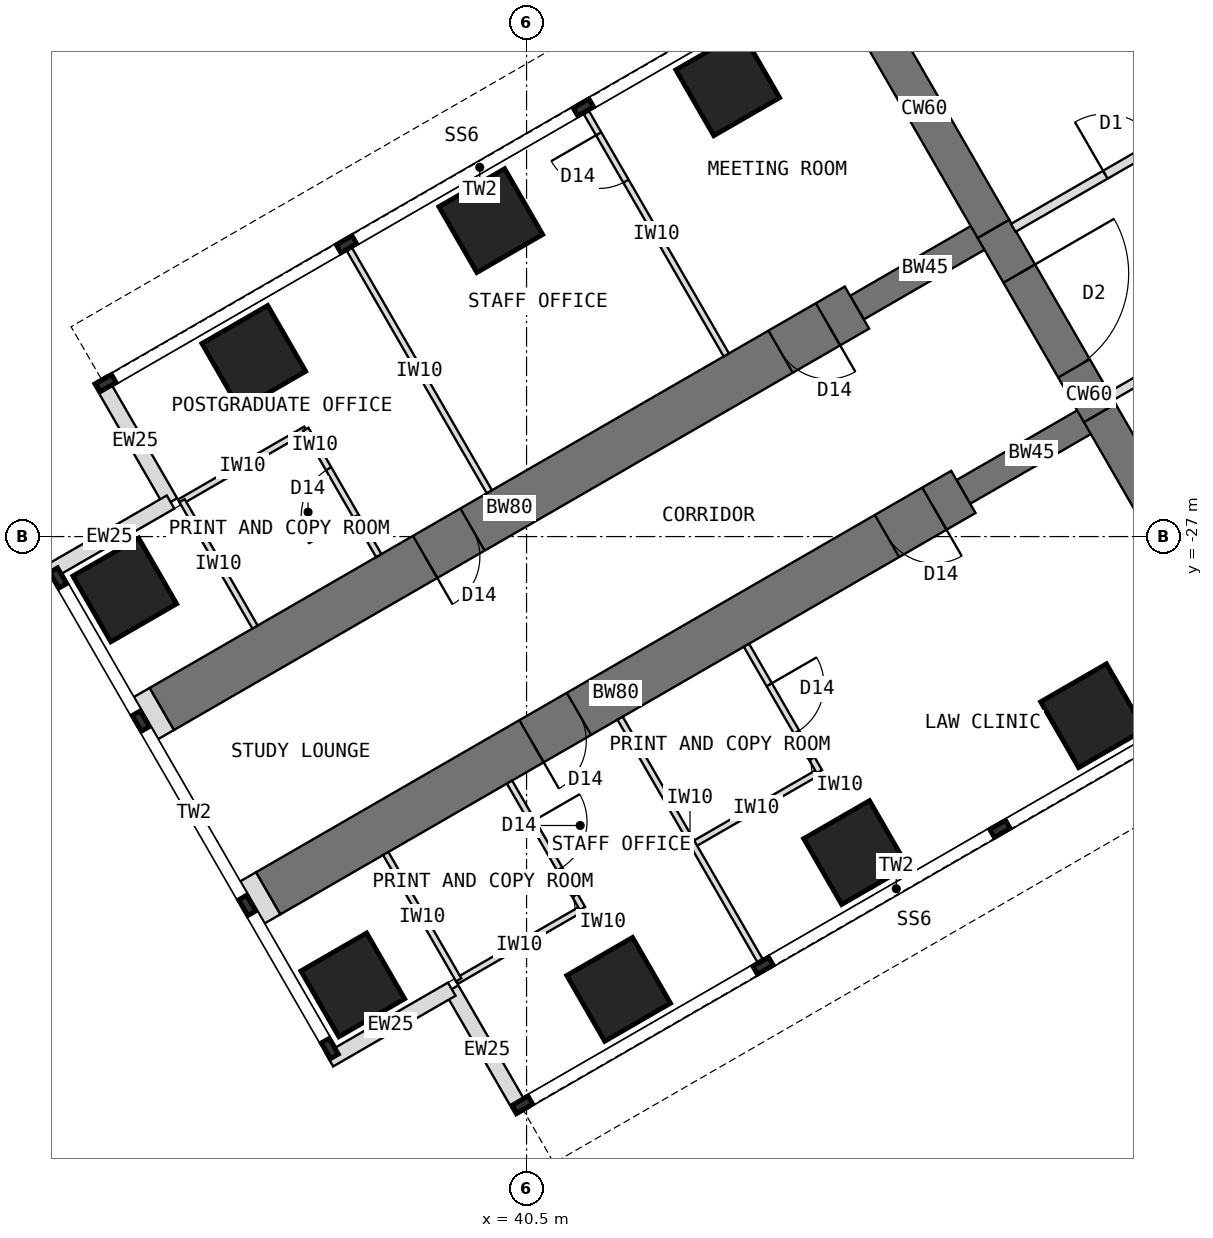
"""IFC4 building model, lengths in metres.
Left out: names, types, materials, properties, quantities, classifications, styles, units other than length and angle.
Written with IfcOpenShell. Run it as: python <this file> out.ifc"""

import sys

from ifc_helpers import new_model, si_unit, direction, frame, frame_2d, origin, origin_2d, place, context, subcontext, project, spatial, rectangle, extrude, element, fill, save


model = new_model("IFC4")
c1 = context("Model", 3, precision=1e-05, world=origin(), true_north=direction((0.0, 1.0)))
c2 = subcontext(c1, "Body", "Model", "MODEL_VIEW")
j1 = project(units=[si_unit("LENGTHUNIT", "METRE"), si_unit("PLANEANGLEUNIT", "RADIAN")], contexts=[c1])
p1 = place(None, origin())
s1 = spatial("IfcSite", under=j1, at=p1, CompositionType="ELEMENT")
p2 = place(p1, origin())
s2 = spatial("IfcBuilding", under=s1, at=p2, CompositionType="ELEMENT")
p3 = place(p2, frame((0.0, 0.0, 145.5)))
s3 = spatial("IfcBuildingStorey", under=s2, at=p3, CompositionType="ELEMENT", Elevation=145.5)
p4 = place(p3, frame((45.904, -18.0, 0.0), z_axis=(0.0, 0.0, 1.0), x_axis=(0.500024481964, -0.866011268655, 0.0)))
e1 = element("IfcWall", 1, at=p4, inside=s3, PredefinedType="SHEAR", context=c2, shape_type="SweptSolid", body=[
    extrude(rectangle(XDim=4.548, YDim=0.6, at=frame_2d((2.274, 0.0))), origin(), (0.0, 0.0, 1.0), 4.0),
])
p5 = place(p3, frame((48.178, -21.939, 0.0), z_axis=(0.0, 0.0, 1.0), x_axis=(0.500010275428, -0.866019471182, 0.0)))
e2 = element("IfcWall", 2, at=p5, inside=s3, PredefinedType="SHEAR", context=c2, shape_type="SweptSolid", body=[
    extrude(rectangle(XDim=3.5, YDim=0.6, at=frame_2d((1.75, 0.0))), origin(), (0.0, 0.0, 1.0), 4.0),
])
p6 = place(p5, frame((0.85, 0.0, 0.0)))
e3 = element("IfcOpeningElement", 3, at=p6, cuts=e2, PredefinedType="OPENING", context=c2, shape_type="SweptSolid", body=[
    extrude(rectangle(XDim=1.8, YDim=2.1, at=frame_2d((0.9, 1.05))), frame((0.0, 0.31, 0.0), z_axis=(0.0, -1.0, 0.0), x_axis=(1.0, 0.0, 0.0)), (0.0, 0.0, 1.0), 0.62),
])
p7 = place(p3, frame((49.928, -24.97, 0.0), z_axis=(0.0, 0.0, 1.0), x_axis=(0.499984222037, -0.866034513004, 0.0)))
e4 = element("IfcWall", 4, at=p7, inside=s3, PredefinedType="SHEAR", context=c2, shape_type="SweptSolid", body=[
    extrude(rectangle(XDim=4.548, YDim=0.6, at=frame_2d((2.274, 0.0))), origin(), (0.0, 0.0, 1.0), 4.0),
])
p8 = place(p3, frame((49.928, -24.97, 0.0), z_axis=(0.0, 0.0, 1.0), x_axis=(-0.866031863473, -0.499988811324, 0.0)))
e5 = element("IfcWall", 5, at=p8, inside=s3, PredefinedType="SHEAR", context=c2, shape_type="SweptSolid", body=[
    extrude(rectangle(XDim=2.592, YDim=0.45, at=frame_2d((1.296, 0.0))), origin(), (0.0, 0.0, 1.0), 4.0),
])
p9 = place(p3, frame((47.684, -26.266, 0.0), z_axis=(0.0, 0.0, 1.0), x_axis=(-0.866027579429, -0.499996231654, 0.0)))
e6 = element("IfcWall", 6, at=p9, inside=s3, PredefinedType="SHEAR", context=c2, shape_type="SweptSolid", body=[
    extrude(rectangle(XDim=13.2, YDim=0.8, at=frame_2d((6.6, 0.0))), origin(), (0.0, 0.0, 1.0), 4.0),
])
p10 = place(p9, frame((0.55, 0.0, 0.0)))
e7 = element("IfcOpeningElement", 7, at=p10, cuts=e6, PredefinedType="OPENING", context=c2, shape_type="SweptSolid", body=[
    extrude(rectangle(XDim=0.9, YDim=2.1, at=frame_2d((0.45, 1.05))), frame((0.0, 0.41, 0.0), z_axis=(0.0, -1.0, 0.0), x_axis=(1.0, 0.0, 0.0)), (0.0, 0.0, 1.0), 0.82),
])
p11 = place(p9, frame((7.3, 0.0, 0.0)))
e8 = element("IfcOpeningElement", 8, at=p11, cuts=e6, PredefinedType="OPENING", context=c2, shape_type="SweptSolid", body=[
    extrude(rectangle(XDim=0.9, YDim=2.1, at=frame_2d((0.45, 1.05))), frame((0.0, 0.41, 0.0), z_axis=(0.0, -1.0, 0.0), x_axis=(1.0, 0.0, 0.0)), (0.0, 0.0, 1.0), 0.82),
])
p12 = place(p3, frame((48.178, -21.939, 0.0), z_axis=(0.0, 0.0, 1.0), x_axis=(-0.866072649678, -0.499918158782, 0.0)))
e9 = element("IfcWall", 9, at=p12, inside=s3, PredefinedType="SHEAR", context=c2, shape_type="SweptSolid", body=[
    extrude(rectangle(XDim=2.592, YDim=0.45, at=frame_2d((1.296, 0.0))), origin(), (0.0, 0.0, 1.0), 4.0),
])
p13 = place(p3, frame((45.934, -23.234, 0.0), z_axis=(0.0, 0.0, 1.0), x_axis=(-0.866019570528, -0.500010103361, 0.0)))
e10 = element("IfcWall", 10, at=p13, inside=s3, PredefinedType="SHEAR", context=c2, shape_type="SweptSolid", body=[
    extrude(rectangle(XDim=13.2, YDim=0.8, at=frame_2d((6.6, 0.0))), origin(), (0.0, 0.0, 1.0), 4.0),
])
p14 = place(p13, frame((0.55, 0.0, 0.0)))
e11 = element("IfcOpeningElement", 11, at=p14, cuts=e10, PredefinedType="OPENING", context=c2, shape_type="SweptSolid", body=[
    extrude(rectangle(XDim=0.9, YDim=2.1, at=frame_2d((0.45, 1.05))), frame((0.0, 0.41, 0.0), z_axis=(0.0, -1.0, 0.0), x_axis=(1.0, 0.0, 0.0)), (0.0, 0.0, 1.0), 0.82),
])
p15 = place(p13, frame((7.3, 0.0, 0.0)))
e12 = element("IfcOpeningElement", 12, at=p15, cuts=e10, PredefinedType="OPENING", context=c2, shape_type="SweptSolid", body=[
    extrude(rectangle(XDim=0.9, YDim=2.1, at=frame_2d((0.45, 1.05))), frame((0.0, 0.41, 0.0), z_axis=(0.0, -1.0, 0.0), x_axis=(1.0, 0.0, 0.0)), (0.0, 0.0, 1.0), 0.82),
])
for number, where, z_axis, x_axis in (
    (13, (49.809, -29.946, 0.0), (0.0, 0.0, 1.0), (0.866, 0.5, 0.0)),
    (14, (43.809, -19.554, 0.0), (0.0, 0.0, 1.0), (0.866, 0.5, 0.0)),
    (15, (45.912, -32.196, 0.0), (0.0, 0.0, 1.0), (0.866, 0.5, 0.0)),
    (16, (39.912, -21.804, 0.0), (0.0, 0.0, 1.0), (0.866, 0.5, 0.0)),
    (17, (42.014, -34.446, 0.0), (0.0, 0.0, 1.0), (0.866, 0.5, 0.0)),
    (18, (36.014, -24.054, 0.0), (0.0, 0.0, 1.0), (0.866, 0.5, 0.0)),
    (19, (37.642, -34.373, 0.0), (0.0, 0.0, 1.0), (0.866, 0.5, 0.0)),
    (20, (33.892, -27.877, 0.0), (0.0, 0.0, 1.0), (0.866, 0.5, 0.0)),
):
    element("IfcColumn", number, at=place(p3, frame(where, z_axis=z_axis, x_axis=x_axis)), inside=s3, PredefinedType="COLUMN", context=c2, shape_type="SweptSolid", body=[
        extrude(rectangle(XDim=1.25, YDim=1.25, at=origin_2d()), origin(), (0.0, 0.0, 1.0), 4.0),
    ])
for number, where, z_axis, x_axis in (
    (21, (40.433, -36.456, 0.0), (0.0, 0.0, 1.0), (-0.5, 0.866, 0.0)),
    (22, (39.27, -34.443, 0.0), (0.0, 0.0, 1.0), (-0.866, -0.5, 0.0)),
    (23, (33.483, -24.419, 0.0), (0.0, 0.0, 1.0), (0.5, -0.866, 0.0)),
    (24, (34.645, -26.432, 0.0), (0.0, 0.0, 1.0), (-0.866, -0.5, 0.0)),
):
    element("IfcWall", number, at=place(p3, frame(where, z_axis=z_axis, x_axis=x_axis)), inside=s3, PredefinedType="STANDARD", context=c2, shape_type="SweptSolid", body=[
        extrude(rectangle(XDim=2.325, YDim=0.25, at=frame_2d((1.163, 0.0))), origin(), (0.0, 0.0, 1.0), 3.8),
    ])
p16 = place(p3, frame((36.252, -32.865, 0.0), z_axis=(0.0, 0.0, 1.0), x_axis=(-0.865778900179, -0.500426713919, 0.0)))
e25 = element("IfcWall", 25, at=p16, inside=s3, PredefinedType="PARTITIONING", context=c2, shape_type="SweptSolid", body=[
    extrude(rectangle(XDim=0.3, YDim=0.8, at=frame_2d((0.15, 0.0))), origin(), (0.0, 0.0, 1.0), 3.8),
])
p17 = place(p3, frame((34.502, -29.834, 0.0), z_axis=(0.0, 0.0, 1.0), x_axis=(-0.866131372301, -0.499816412211, 0.0)))
e26 = element("IfcWall", 26, at=p17, inside=s3, PredefinedType="PARTITIONING", context=c2, shape_type="SweptSolid", body=[
    extrude(rectangle(XDim=0.3, YDim=0.8, at=frame_2d((0.15, 0.0))), origin(), (0.0, 0.0, 1.0), 3.8),
])
p18 = place(p3, frame((52.38, -19.201, 0.0), z_axis=(0.0, 0.0, 1.0), x_axis=(-0.866027317282, 0.49999668571, 0.0)))
e27 = element("IfcWall", 27, at=p18, inside=s3, PredefinedType="SHEAR", context=c2, shape_type="SweptSolid", body=[
    extrude(rectangle(XDim=5.908, YDim=0.4, at=frame_2d((2.954, 0.0))), origin(), (0.0, 0.0, 1.0), 4.0),
])
p19 = place(p3, frame((42.038, -29.987, 0.0), z_axis=(0.0, 0.0, 1.0), x_axis=(0.499975146636, -0.866039752405, 0.0)))
e28 = element("IfcWall", 28, at=p19, inside=s3, PredefinedType="PARTITIONING", context=c2, shape_type="SweptSolid", body=[
    extrude(rectangle(XDim=4.6, YDim=0.1, at=frame_2d((2.3, 0.0))), origin(), (0.0, 0.0, 1.0), 3.8),
])
p20 = place(p3, frame((45.316, -30.865, 0.0), z_axis=(0.0, 0.0, 1.0), x_axis=(-0.866024647952, -0.500001309137, 0.0)))
e29 = element("IfcWall", 29, at=p20, inside=s3, PredefinedType="PARTITIONING", context=c2, shape_type="SweptSolid", body=[
    extrude(rectangle(XDim=2.4, YDim=0.1, at=frame_2d((1.2, 0.0))), origin(), (0.0, 0.0, 1.0), 3.8),
])
p21 = place(p3, frame((44.116, -28.787, 0.0), z_axis=(0.0, 0.0, 1.0), x_axis=(0.499957262057, -0.866050077142, 0.0)))
e30 = element("IfcWall", 30, at=p21, inside=s3, PredefinedType="PARTITIONING", context=c2, shape_type="SweptSolid", body=[
    extrude(rectangle(XDim=2.4, YDim=0.1, at=frame_2d((1.2, 0.0))), origin(), (0.0, 0.0, 1.0), 3.8),
])
p22 = place(p21, frame((0.75, 0.0, 0.0)))
e31 = element("IfcOpeningElement", 31, at=p22, cuts=e30, PredefinedType="OPENING", context=c2, shape_type="SweptSolid", body=[
    extrude(rectangle(XDim=0.9, YDim=2.1, at=frame_2d((0.45, 1.05))), frame((0.0, 0.06, 0.0), z_axis=(0.0, -1.0, 0.0), x_axis=(1.0, 0.0, 0.0)), (0.0, 0.0, 1.0), 0.12),
])
p23 = place(p3, frame((41.419, -33.115, 0.0), z_axis=(0.0, 0.0, 1.0), x_axis=(-0.866050077142, -0.499957262057, 0.0)))
e32 = element("IfcWall", 32, at=p23, inside=s3, PredefinedType="PARTITIONING", context=c2, shape_type="SweptSolid", body=[
    extrude(rectangle(XDim=2.4, YDim=0.1, at=frame_2d((1.2, 0.0))), origin(), (0.0, 0.0, 1.0), 3.8),
])
p24 = place(p3, frame((40.219, -31.037, 0.0), z_axis=(0.0, 0.0, 1.0), x_axis=(0.500033551112, -0.866006032174, 0.0)))
e33 = element("IfcWall", 33, at=p24, inside=s3, PredefinedType="PARTITIONING", context=c2, shape_type="SweptSolid", body=[
    extrude(rectangle(XDim=2.4, YDim=0.1, at=frame_2d((1.2, 0.0))), origin(), (0.0, 0.0, 1.0), 3.8),
])
p25 = place(p24, frame((0.75, 0.0, 0.0)))
e34 = element("IfcOpeningElement", 34, at=p25, cuts=e33, PredefinedType="OPENING", context=c2, shape_type="SweptSolid", body=[
    extrude(rectangle(XDim=0.9, YDim=2.1, at=frame_2d((0.45, 1.05))), frame((0.0, 0.06, 0.0), z_axis=(0.0, -1.0, 0.0), x_axis=(1.0, 0.0, 0.0)), (0.0, 0.0, 1.0), 0.12),
])
p26 = place(p3, frame((38.184, -32.212, 0.0), z_axis=(0.0, 0.0, 1.0), x_axis=(0.500033551112, -0.866006032174, 0.0)))
e35 = element("IfcWall", 35, at=p26, inside=s3, PredefinedType="PARTITIONING", context=c2, shape_type="SweptSolid", body=[
    extrude(rectangle(XDim=2.4, YDim=0.1, at=frame_2d((1.2, 0.0))), origin(), (0.0, 0.0, 1.0), 3.8),
])
p27 = place(p3, frame((43.785, -24.013, 0.0), z_axis=(0.0, 0.0, 1.0), x_axis=(-0.500014953309, 0.866016770315, 0.0)))
e36 = element("IfcWall", 36, at=p27, inside=s3, PredefinedType="PARTITIONING", context=c2, shape_type="SweptSolid", body=[
    extrude(rectangle(XDim=4.6, YDim=0.1, at=frame_2d((2.3, 0.0))), origin(), (0.0, 0.0, 1.0), 3.8),
])
p28 = place(p27, frame((3.3, 0.0, 0.0)))
e37 = element("IfcOpeningElement", 37, at=p28, cuts=e36, PredefinedType="OPENING", context=c2, shape_type="SweptSolid", body=[
    extrude(rectangle(XDim=0.9, YDim=2.1, at=frame_2d((0.45, 1.05))), frame((0.0, 0.06, 0.0), z_axis=(0.0, -1.0, 0.0), x_axis=(1.0, 0.0, 0.0)), (0.0, 0.0, 1.0), 0.12),
])
p29 = place(p3, frame((39.888, -26.263, 0.0), z_axis=(0.0, 0.0, 1.0), x_axis=(-0.500014953309, 0.866016770315, 0.0)))
e38 = element("IfcWall", 38, at=p29, inside=s3, PredefinedType="PARTITIONING", context=c2, shape_type="SweptSolid", body=[
    extrude(rectangle(XDim=4.6, YDim=0.1, at=frame_2d((2.3, 0.0))), origin(), (0.0, 0.0, 1.0), 3.8),
])
p30 = place(p3, frame((36.869, -25.235, 0.0), z_axis=(0.0, 0.0, 1.0), x_axis=(-0.866050077142, -0.499957262057, 0.0)))
e39 = element("IfcWall", 39, at=p30, inside=s3, PredefinedType="PARTITIONING", context=c2, shape_type="SweptSolid", body=[
    extrude(rectangle(XDim=2.4, YDim=0.1, at=frame_2d((1.2, 0.0))), origin(), (0.0, 0.0, 1.0), 3.8),
])
p31 = place(p3, frame((38.069, -27.313, 0.0), z_axis=(0.0, 0.0, 1.0), x_axis=(-0.500001309137, 0.866024647952, 0.0)))
e40 = element("IfcWall", 40, at=p31, inside=s3, PredefinedType="PARTITIONING", context=c2, shape_type="SweptSolid", body=[
    extrude(rectangle(XDim=2.4, YDim=0.1, at=frame_2d((1.2, 0.0))), origin(), (0.0, 0.0, 1.0), 3.8),
])
p32 = place(p31, frame((0.75, 0.0, 0.0)))
e41 = element("IfcOpeningElement", 41, at=p32, cuts=e40, PredefinedType="OPENING", context=c2, shape_type="SweptSolid", body=[
    extrude(rectangle(XDim=0.9, YDim=2.1, at=frame_2d((0.45, 1.05))), frame((0.0, 0.06, 0.0), z_axis=(0.0, -1.0, 0.0), x_axis=(1.0, 0.0, 0.0)), (0.0, 0.0, 1.0), 0.12),
])
p33 = place(p3, frame((36.034, -28.488, 0.0), z_axis=(0.0, 0.0, 1.0), x_axis=(-0.500001309137, 0.866024647952, 0.0)))
e42 = element("IfcWall", 42, at=p33, inside=s3, PredefinedType="PARTITIONING", context=c2, shape_type="SweptSolid", body=[
    extrude(rectangle(XDim=2.4, YDim=0.1, at=frame_2d((1.2, 0.0))), origin(), (0.0, 0.0, 1.0), 3.8),
])
p34 = place(p3, frame((54.017, -22.436, 0.0), z_axis=(0.0, 0.0, 1.0), x_axis=(-0.86602002524, -0.500009315796, 0.0)))
e43 = element("IfcWall", 43, at=p34, inside=s3, PredefinedType="PARTITIONING", context=c2, shape_type="SweptSolid", body=[
    extrude(rectangle(XDim=4.519, YDim=0.15, at=frame_2d((2.259, 0.0))), origin(), (0.0, 0.0, 1.0), 3.8),
])
p35 = place(p34, frame((1.769, 0.0, 0.0)))
e44 = element("IfcOpeningElement", 44, at=p35, cuts=e43, PredefinedType="OPENING", context=c2, shape_type="SweptSolid", body=[
    extrude(rectangle(XDim=1.0, YDim=2.1, at=frame_2d((0.5, 1.05))), frame((0.0, 0.085, 0.0), z_axis=(0.0, -1.0, 0.0), x_axis=(1.0, 0.0, 0.0)), (0.0, 0.0, 1.0), 0.17),
])
p36 = place(p3, frame((48.504, -21.924, 0.0), z_axis=(0.0, 0.0, 1.0), x_axis=(0.866006515865, 0.500032713409, 0.0)))
e45 = element("IfcWall", 45, at=p36, inside=s3, PredefinedType="PARTITIONING", context=c2, shape_type="SweptSolid", body=[
    extrude(rectangle(XDim=4.518, YDim=0.15, at=frame_2d((2.259, 0.0))), origin(), (0.0, 0.0, 1.0), 3.8),
])
p37 = place(p36, frame((1.749, 0.0, 0.0)))
e46 = element("IfcOpeningElement", 46, at=p37, cuts=e45, PredefinedType="OPENING", context=c2, shape_type="SweptSolid", body=[
    extrude(rectangle(XDim=1.0, YDim=2.1, at=frame_2d((0.5, 1.05))), frame((0.0, 0.085, 0.0), z_axis=(0.0, -1.0, 0.0), x_axis=(1.0, 0.0, 0.0)), (0.0, 0.0, 1.0), 0.17),
])
p38 = place(p6, origin())
e47 = element("IfcDoor", 47, at=p38, inside=s3, OperationType="DOUBLE_DOOR_DOUBLE_SWING", PredefinedType="DOOR", context=c2, shape_type="SweptSolid", body=[
    extrude(rectangle(XDim=1.72, YDim=2.06, at=frame_2d((0.9, 1.03))), frame((0.0, 0.025, 0.0), z_axis=(0.0, -1.0, 0.0), x_axis=(1.0, 0.0, 0.0)), (0.0, 0.0, 1.0), 0.05),
    extrude(rectangle(XDim=0.04, YDim=2.1, at=frame_2d((0.02, 1.05))), frame((0.0, 0.3, 0.0), z_axis=(0.0, -1.0, 0.0), x_axis=(1.0, 0.0, 0.0)), (0.0, 0.0, 1.0), 0.6),
    extrude(rectangle(XDim=0.04, YDim=2.1, at=frame_2d((1.78, 1.05))), frame((0.0, 0.3, 0.0), z_axis=(0.0, -1.0, 0.0), x_axis=(1.0, 0.0, 0.0)), (0.0, 0.0, 1.0), 0.6),
    extrude(rectangle(XDim=1.72, YDim=0.04, at=frame_2d((0.9, 2.08))), frame((0.0, 0.3, 0.0), z_axis=(0.0, -1.0, 0.0), x_axis=(1.0, 0.0, 0.0)), (0.0, 0.0, 1.0), 0.6),
])
fill(e3, e47)
p39 = place(p22, origin())
e48 = element("IfcDoor", 48, at=p39, inside=s3, OperationType="SINGLE_SWING_LEFT", PredefinedType="DOOR", context=c2, shape_type="SweptSolid", body=[
    extrude(rectangle(XDim=0.9, YDim=2.1, at=frame_2d((0.45, 1.05))), frame((0.0, 0.025, 0.0), z_axis=(0.0, -1.0, 0.0), x_axis=(1.0, 0.0, 0.0)), (0.0, 0.0, 1.0), 0.05),
])
fill(e31, e48)
p40 = place(p25, origin())
e49 = element("IfcDoor", 49, at=p40, inside=s3, OperationType="SINGLE_SWING_LEFT", PredefinedType="DOOR", context=c2, shape_type="SweptSolid", body=[
    extrude(rectangle(XDim=0.9, YDim=2.1, at=frame_2d((0.45, 1.05))), frame((0.0, 0.025, 0.0), z_axis=(0.0, -1.0, 0.0), x_axis=(1.0, 0.0, 0.0)), (0.0, 0.0, 1.0), 0.05),
])
fill(e34, e49)
p41 = place(p28, origin())
e50 = element("IfcDoor", 50, at=p41, inside=s3, OperationType="SINGLE_SWING_RIGHT", PredefinedType="DOOR", context=c2, shape_type="SweptSolid", body=[
    extrude(rectangle(XDim=0.9, YDim=2.1, at=frame_2d((0.45, 1.05))), frame((0.0, 0.025, 0.0), z_axis=(0.0, -1.0, 0.0), x_axis=(1.0, 0.0, 0.0)), (0.0, 0.0, 1.0), 0.05),
])
fill(e37, e50)
p42 = place(p32, origin())
e51 = element("IfcDoor", 51, at=p42, inside=s3, OperationType="SINGLE_SWING_LEFT", PredefinedType="DOOR", context=c2, shape_type="SweptSolid", body=[
    extrude(rectangle(XDim=0.9, YDim=2.1, at=frame_2d((0.45, 1.05))), frame((0.0, 0.025, 0.0), z_axis=(0.0, -1.0, 0.0), x_axis=(1.0, 0.0, 0.0)), (0.0, 0.0, 1.0), 0.05),
])
fill(e41, e51)
p43 = place(p37, origin())
e52 = element("IfcDoor", 52, at=p43, inside=s3, OperationType="SINGLE_SWING_LEFT", PredefinedType="DOOR", context=c2, shape_type="SweptSolid", body=[
    extrude(rectangle(XDim=1.0, YDim=2.1, at=frame_2d((0.5, 1.05))), frame((0.0, 0.025, 0.0), z_axis=(0.0, -1.0, 0.0), x_axis=(1.0, 0.0, 0.0)), (0.0, 0.0, 1.0), 0.05),
])
fill(e46, e52)
p44 = place(p10, origin())
e53 = element("IfcDoor", 53, at=p44, inside=s3, OperationType="SINGLE_SWING_LEFT", PredefinedType="DOOR", context=c2, shape_type="SweptSolid", body=[
    extrude(rectangle(XDim=0.82, YDim=2.06, at=frame_2d((0.45, 1.03))), frame((0.0, 0.025, 0.0), z_axis=(0.0, -1.0, 0.0), x_axis=(1.0, 0.0, 0.0)), (0.0, 0.0, 1.0), 0.05),
    extrude(rectangle(XDim=0.04, YDim=2.1, at=frame_2d((0.02, 1.05))), frame((0.0, 0.4, 0.0), z_axis=(0.0, -1.0, 0.0), x_axis=(1.0, 0.0, 0.0)), (0.0, 0.0, 1.0), 0.8),
    extrude(rectangle(XDim=0.04, YDim=2.1, at=frame_2d((0.88, 1.05))), frame((0.0, 0.4, 0.0), z_axis=(0.0, -1.0, 0.0), x_axis=(1.0, 0.0, 0.0)), (0.0, 0.0, 1.0), 0.8),
    extrude(rectangle(XDim=0.82, YDim=0.04, at=frame_2d((0.45, 2.08))), frame((0.0, 0.4, 0.0), z_axis=(0.0, -1.0, 0.0), x_axis=(1.0, 0.0, 0.0)), (0.0, 0.0, 1.0), 0.8),
])
fill(e7, e53)
p45 = place(p11, origin())
e54 = element("IfcDoor", 54, at=p45, inside=s3, OperationType="SINGLE_SWING_RIGHT", PredefinedType="DOOR", context=c2, shape_type="SweptSolid", body=[
    extrude(rectangle(XDim=0.82, YDim=2.06, at=frame_2d((0.45, 1.03))), frame((0.0, 0.025, 0.0), z_axis=(0.0, -1.0, 0.0), x_axis=(1.0, 0.0, 0.0)), (0.0, 0.0, 1.0), 0.05),
    extrude(rectangle(XDim=0.04, YDim=2.1, at=frame_2d((0.02, 1.05))), frame((0.0, 0.4, 0.0), z_axis=(0.0, -1.0, 0.0), x_axis=(1.0, 0.0, 0.0)), (0.0, 0.0, 1.0), 0.8),
    extrude(rectangle(XDim=0.04, YDim=2.1, at=frame_2d((0.88, 1.05))), frame((0.0, 0.4, 0.0), z_axis=(0.0, -1.0, 0.0), x_axis=(1.0, 0.0, 0.0)), (0.0, 0.0, 1.0), 0.8),
    extrude(rectangle(XDim=0.82, YDim=0.04, at=frame_2d((0.45, 2.08))), frame((0.0, 0.4, 0.0), z_axis=(0.0, -1.0, 0.0), x_axis=(1.0, 0.0, 0.0)), (0.0, 0.0, 1.0), 0.8),
])
fill(e8, e54)
p46 = place(p14, origin())
e55 = element("IfcDoor", 55, at=p46, inside=s3, OperationType="SINGLE_SWING_LEFT", PredefinedType="DOOR", context=c2, shape_type="SweptSolid", body=[
    extrude(rectangle(XDim=0.82, YDim=2.06, at=frame_2d((0.45, 1.03))), frame((0.0, 0.025, 0.0), z_axis=(0.0, -1.0, 0.0), x_axis=(1.0, 0.0, 0.0)), (0.0, 0.0, 1.0), 0.05),
    extrude(rectangle(XDim=0.04, YDim=2.1, at=frame_2d((0.02, 1.05))), frame((0.0, 0.4, 0.0), z_axis=(0.0, -1.0, 0.0), x_axis=(1.0, 0.0, 0.0)), (0.0, 0.0, 1.0), 0.8),
    extrude(rectangle(XDim=0.04, YDim=2.1, at=frame_2d((0.88, 1.05))), frame((0.0, 0.4, 0.0), z_axis=(0.0, -1.0, 0.0), x_axis=(1.0, 0.0, 0.0)), (0.0, 0.0, 1.0), 0.8),
    extrude(rectangle(XDim=0.82, YDim=0.04, at=frame_2d((0.45, 2.08))), frame((0.0, 0.4, 0.0), z_axis=(0.0, -1.0, 0.0), x_axis=(1.0, 0.0, 0.0)), (0.0, 0.0, 1.0), 0.8),
])
fill(e11, e55)
p47 = place(p15, origin())
e56 = element("IfcDoor", 56, at=p47, inside=s3, OperationType="SINGLE_SWING_RIGHT", PredefinedType="DOOR", context=c2, shape_type="SweptSolid", body=[
    extrude(rectangle(XDim=0.82, YDim=2.06, at=frame_2d((0.45, 1.03))), frame((0.0, 0.025, 0.0), z_axis=(0.0, -1.0, 0.0), x_axis=(1.0, 0.0, 0.0)), (0.0, 0.0, 1.0), 0.05),
    extrude(rectangle(XDim=0.04, YDim=2.1, at=frame_2d((0.02, 1.05))), frame((0.0, 0.4, 0.0), z_axis=(0.0, -1.0, 0.0), x_axis=(1.0, 0.0, 0.0)), (0.0, 0.0, 1.0), 0.8),
    extrude(rectangle(XDim=0.04, YDim=2.1, at=frame_2d((0.88, 1.05))), frame((0.0, 0.4, 0.0), z_axis=(0.0, -1.0, 0.0), x_axis=(1.0, 0.0, 0.0)), (0.0, 0.0, 1.0), 0.8),
    extrude(rectangle(XDim=0.82, YDim=0.04, at=frame_2d((0.45, 2.08))), frame((0.0, 0.4, 0.0), z_axis=(0.0, -1.0, 0.0), x_axis=(1.0, 0.0, 0.0)), (0.0, 0.0, 1.0), 0.8),
])
fill(e12, e56)
save(model, sys.argv[1])
